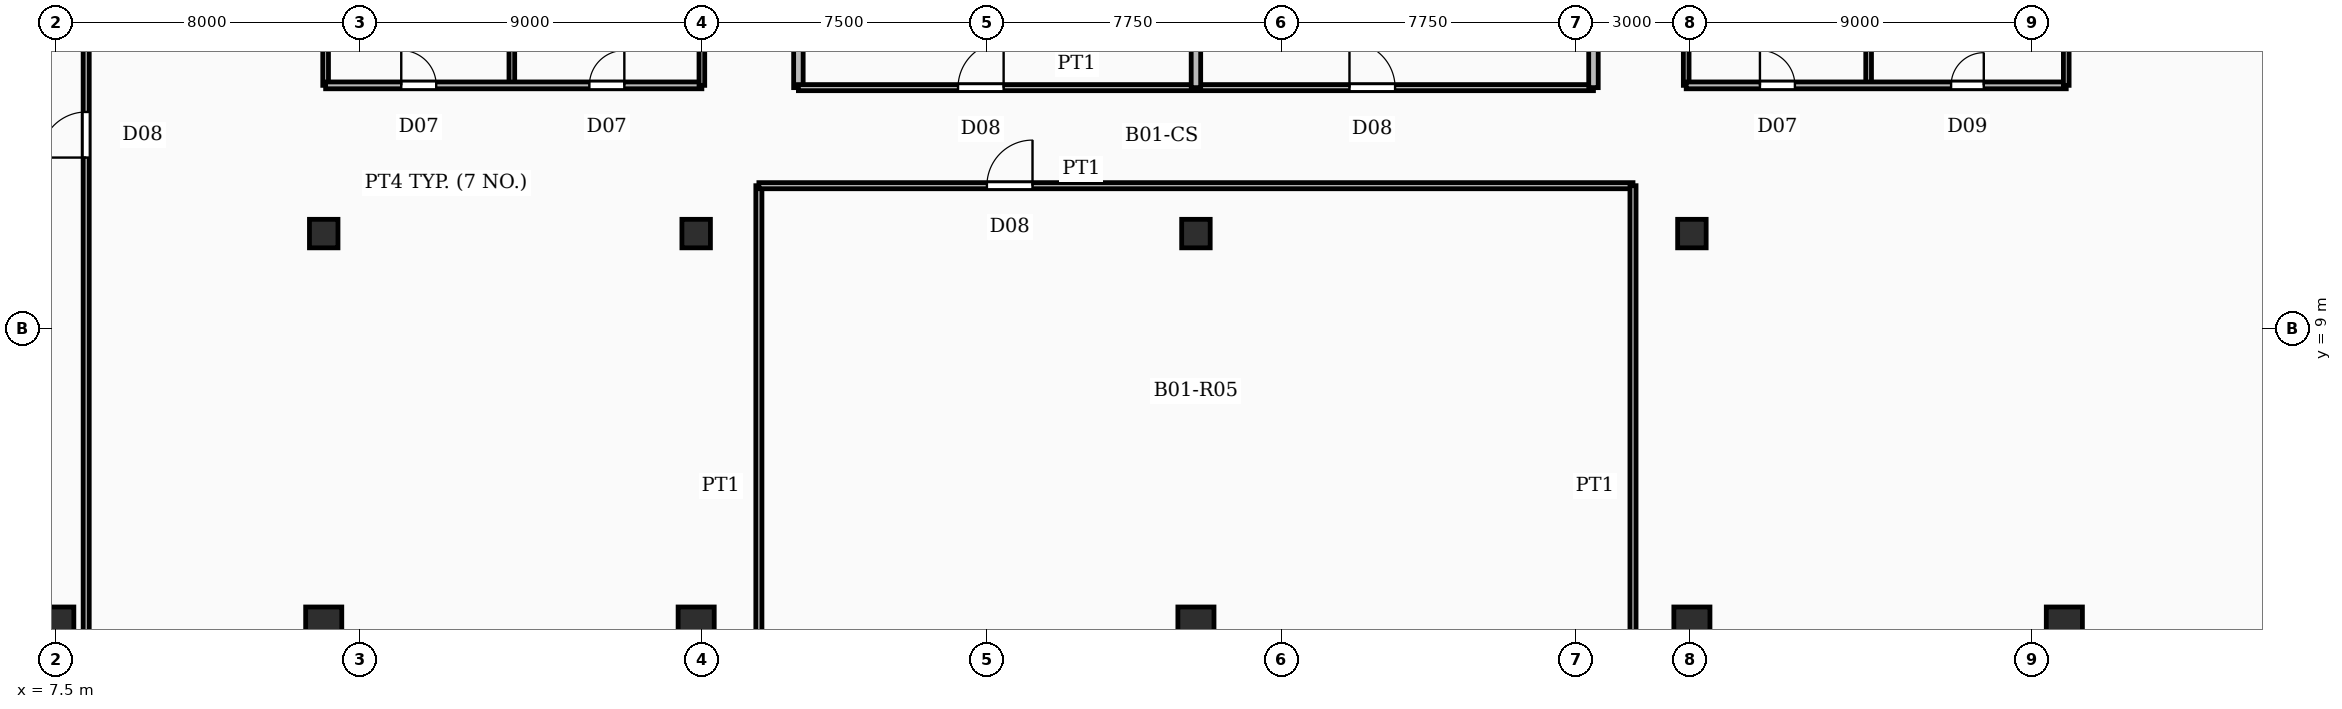
"""IFC4 building model, lengths in metres.
Left out: names, types, materials, properties, quantities, classifications, styles, units other than length and angle.
Written with IfcOpenShell. Run it as: python <this file> out.ifc"""

import sys

from ifc_helpers import new_model, si_unit, direction, frame, frame_2d, origin, origin_2d, place, context, subcontext, project, spatial, rectangle, extrude, element, fill, save


model = new_model("IFC4")
c1 = context("Model", 3, precision=1e-05, world=origin(), true_north=direction((0.0, 1.0)))
c2 = subcontext(c1, "Body", "Model", "MODEL_VIEW")
j1 = project(units=[si_unit("LENGTHUNIT", "METRE"), si_unit("PLANEANGLEUNIT", "RADIAN")], contexts=[c1])
p1 = place(None, origin())
s1 = spatial("IfcSite", under=j1, at=p1, CompositionType="ELEMENT")
p2 = place(p1, origin())
s2 = spatial("IfcBuilding", under=s1, at=p2, CompositionType="ELEMENT")
p3 = place(p2, frame((0.0, 0.0, -5.0)))
s3 = spatial("IfcBuildingStorey", under=s2, at=p3, CompositionType="ELEMENT", Elevation=-5.0)
for number, where, z_axis, x_axis in (
    (1, (7.5, 1.2, -0.31), (0.0, 0.0, 1.0), (1.0, 0.0, 0.0)),
    (2, (14.55, 1.2, -0.31), (0.0, 0.0, 1.0), (1.0, 0.0, 0.0)),
    (3, (24.35, 1.2, -0.31), (0.0, 0.0, 1.0), (1.0, 0.0, 0.0)),
    (4, (37.5, 1.2, -0.31), (0.0, 0.0, 1.0), (1.0, 0.0, 0.0)),
    (5, (50.55, 1.2, -0.31), (0.0, 0.0, 1.0), (1.0, 0.0, 0.0)),
    (6, (60.35, 1.2, -0.31), (0.0, 0.0, 1.0), (1.0, 0.0, 0.0)),
):
    element("IfcColumn", number, at=place(p3, frame(where, z_axis=z_axis, x_axis=x_axis)), inside=s3, PredefinedType="COLUMN", context=c2, shape_type="SweptSolid", body=[
        extrude(rectangle(XDim=0.95, YDim=0.95, at=origin_2d()), origin(), (0.0, 0.0, 1.0), 4.86),
    ])
for number, where, z_axis, x_axis in (
    (7, (14.55, 11.5, -0.31), (0.0, 0.0, 1.0), (1.0, 0.0, 0.0)),
    (8, (24.35, 11.5, -0.31), (0.0, 0.0, 1.0), (1.0, 0.0, 0.0)),
    (9, (37.5, 11.5, -0.31), (0.0, 0.0, 1.0), (1.0, 0.0, 0.0)),
    (10, (50.55, 11.5, -0.31), (0.0, 0.0, 1.0), (1.0, 0.0, 0.0)),
):
    element("IfcColumn", number, at=place(p3, frame(where, z_axis=z_axis, x_axis=x_axis)), inside=s3, PredefinedType="COLUMN", context=c2, shape_type="SweptSolid", body=[
        extrude(rectangle(XDim=0.75, YDim=0.75, at=origin_2d()), origin(), (0.0, 0.0, 1.0), 4.86),
    ])
p4 = place(p3, frame((19.5, 15.4, 0.0), z_axis=(0.0, 0.0, 1.0), x_axis=(0.0, 1.0, 0.0)))
e11 = element("IfcWall", 11, at=p4, inside=s3, PredefinedType="PARTITIONING", context=c2, shape_type="SweptSolid", body=[
    extrude(rectangle(XDim=3.58, YDim=0.15, at=frame_2d((1.79, 0.0))), origin(), (0.0, 0.0, 1.0), 3.61),
])
p5 = place(p3, frame((14.6, 15.4, 0.0), z_axis=(0.0, 0.0, 1.0), x_axis=(1.0, 0.0, 0.0)))
e12 = element("IfcWall", 12, at=p5, inside=s3, PredefinedType="PARTITIONING", context=c2, shape_type="SweptSolid", body=[
    extrude(rectangle(XDim=9.9, YDim=0.18, at=frame_2d((4.95, 0.0))), origin(), (0.0, 0.0, 1.0), 3.61),
])
p6 = place(p5, frame((1.99, 0.0, 0.0)))
e13 = element("IfcOpeningElement", 13, at=p6, cuts=e12, PredefinedType="OPENING", context=c2, shape_type="SweptSolid", body=[
    extrude(rectangle(XDim=0.92, YDim=2.1, at=frame_2d((0.46, 1.05))), frame((0.0, 0.1, 0.0), z_axis=(0.0, -1.0, 0.0), x_axis=(1.0, 0.0, 0.0)), (0.0, 0.0, 1.0), 0.2),
])
p7 = place(p5, frame((6.94, 0.0, 0.0)))
e14 = element("IfcOpeningElement", 14, at=p7, cuts=e12, PredefinedType="OPENING", context=c2, shape_type="SweptSolid", body=[
    extrude(rectangle(XDim=0.92, YDim=2.1, at=frame_2d((0.46, 1.05))), frame((0.0, 0.1, 0.0), z_axis=(0.0, -1.0, 0.0), x_axis=(1.0, 0.0, 0.0)), (0.0, 0.0, 1.0), 0.2),
])
for number, where, z_axis, x_axis in (
    (15, (14.6, 15.4, 0.0), (0.0, 0.0, 1.0), (0.0, 1.0, 0.0)),
    (16, (24.5, 15.4, 0.0), (0.0, 0.0, 1.0), (0.0, 1.0, 0.0)),
    (17, (55.2, 15.4, 0.0), (0.0, 0.0, 1.0), (0.0, 1.0, 0.0)),
):
    element("IfcWall", number, at=place(p3, frame(where, z_axis=z_axis, x_axis=x_axis)), inside=s3, PredefinedType="PARTITIONING", context=c2, shape_type="SweptSolid", body=[
        extrude(rectangle(XDim=3.58, YDim=0.15, at=frame_2d((1.79, 0.0))), origin(), (0.0, 0.0, 1.0), 3.61),
    ])
p8 = place(p3, frame((50.4, 15.4, 0.0), z_axis=(0.0, 0.0, 1.0), x_axis=(1.0, 0.0, 0.0)))
e18 = element("IfcWall", 18, at=p8, inside=s3, PredefinedType="SOLIDWALL", context=c2, shape_type="SweptSolid", body=[
    extrude(rectangle(XDim=10.0, YDim=0.18, at=frame_2d((5.0, 0.0))), origin(), (0.0, 0.0, 1.0), 3.61),
])
p9 = place(p8, frame((1.94, 0.0, 0.0)))
e19 = element("IfcOpeningElement", 19, at=p9, cuts=e18, PredefinedType="OPENING", context=c2, shape_type="SweptSolid", body=[
    extrude(rectangle(XDim=0.92, YDim=2.1, at=frame_2d((0.46, 1.05))), frame((0.0, 0.1, 0.0), z_axis=(0.0, -1.0, 0.0), x_axis=(1.0, 0.0, 0.0)), (0.0, 0.0, 1.0), 0.2),
])
p10 = place(p8, frame((6.97, 0.0, 0.0)))
e20 = element("IfcOpeningElement", 20, at=p10, cuts=e18, PredefinedType="OPENING", context=c2, shape_type="SweptSolid", body=[
    extrude(rectangle(XDim=0.86, YDim=2.05, at=frame_2d((0.43, 1.025))), frame((0.0, 0.1, 0.0), z_axis=(0.0, -1.0, 0.0), x_axis=(1.0, 0.0, 0.0)), (0.0, 0.0, 1.0), 0.2),
])
for number, where, z_axis, x_axis in (
    (21, (50.4, 15.4, 0.0), (0.0, 0.0, 1.0), (0.0, 1.0, 0.0)),
    (22, (60.4, 15.4, 0.0), (0.0, 0.0, 1.0), (0.0, 1.0, 0.0)),
):
    element("IfcWall", number, at=place(p3, frame(where, z_axis=z_axis, x_axis=x_axis)), inside=s3, PredefinedType="PARTITIONING", context=c2, shape_type="SweptSolid", body=[
        extrude(rectangle(XDim=3.58, YDim=0.15, at=frame_2d((1.79, 0.0))), origin(), (0.0, 0.0, 1.0), 3.61),
    ])
p11 = place(p3, frame((27.04, 15.34, 0.0), z_axis=(0.0, 0.0, 1.0), x_axis=(1.0, 0.0, 0.0)))
e23 = element("IfcWall", 23, at=p11, inside=s3, PredefinedType="PARTITIONING", context=c2, shape_type="SweptSolid", body=[
    extrude(rectangle(XDim=20.92, YDim=0.16, at=frame_2d((10.46, 0.0))), origin(), (0.0, 0.0, 1.0), 3.61),
])
p12 = place(p11, frame((4.2, 0.0, 0.0)))
e24 = element("IfcOpeningElement", 24, at=p12, cuts=e23, PredefinedType="OPENING", context=c2, shape_type="SweptSolid", body=[
    extrude(rectangle(XDim=1.2, YDim=2.2, at=frame_2d((0.6, 1.1))), frame((0.0, 0.09, 0.0), z_axis=(0.0, -1.0, 0.0), x_axis=(1.0, 0.0, 0.0)), (0.0, 0.0, 1.0), 0.18),
])
p13 = place(p11, frame((14.5, 0.0, 0.0)))
e25 = element("IfcOpeningElement", 25, at=p13, cuts=e23, PredefinedType="OPENING", context=c2, shape_type="SweptSolid", body=[
    extrude(rectangle(XDim=1.2, YDim=2.2, at=frame_2d((0.6, 1.1))), frame((0.0, 0.09, 0.0), z_axis=(0.0, -1.0, 0.0), x_axis=(1.0, 0.0, 0.0)), (0.0, 0.0, 1.0), 0.18),
])
p14 = place(p3, frame((26.0, 12.76, 0.0), z_axis=(0.0, 0.0, 1.0), x_axis=(1.0, 0.0, 0.0)))
e26 = element("IfcWall", 26, at=p14, inside=s3, PredefinedType="PARTITIONING", context=c2, shape_type="SweptSolid", body=[
    extrude(rectangle(XDim=23.0, YDim=0.16, at=frame_2d((11.5, 0.0))), origin(), (0.0, 0.0, 1.0), 3.61),
])
p15 = place(p14, frame((6.0, 0.0, 0.0)))
e27 = element("IfcOpeningElement", 27, at=p15, cuts=e26, PredefinedType="OPENING", context=c2, shape_type="SweptSolid", body=[
    extrude(rectangle(XDim=1.2, YDim=2.2, at=frame_2d((0.6, 1.1))), frame((0.0, 0.09, 0.0), z_axis=(0.0, -1.0, 0.0), x_axis=(1.0, 0.0, 0.0)), (0.0, 0.0, 1.0), 0.18),
])
for number, where, z_axis, x_axis in (
    (28, (26.0, 0.6, 0.0), (0.0, 0.0, 1.0), (0.0, 1.0, 0.0)),
    (29, (49.0, 0.6, 0.0), (0.0, 0.0, 1.0), (0.0, 1.0, 0.0)),
):
    element("IfcWall", number, at=place(p3, frame(where, z_axis=z_axis, x_axis=x_axis)), inside=s3, PredefinedType="PARTITIONING", context=c2, shape_type="SweptSolid", body=[
        extrude(rectangle(XDim=12.16, YDim=0.16, at=frame_2d((6.08, 0.0))), origin(), (0.0, 0.0, 1.0), 3.61),
    ])
p16 = place(p3, frame((8.3, 0.5, 0.0), z_axis=(0.0, 0.0, 1.0), x_axis=(0.0, 1.0, 0.0)))
e30 = element("IfcWall", 30, at=p16, inside=s3, PredefinedType="PARTITIONING", context=c2, shape_type="SweptSolid", body=[
    extrude(rectangle(XDim=53.5, YDim=0.16, at=frame_2d((26.75, 0.0))), origin(), (0.0, 0.0, 1.0), 3.61),
])
p17 = place(p16, frame((13.0, 0.0, 0.0)))
e31 = element("IfcOpeningElement", 31, at=p17, cuts=e30, PredefinedType="OPENING", context=c2, shape_type="SweptSolid", body=[
    extrude(rectangle(XDim=1.2, YDim=2.2, at=frame_2d((0.6, 1.1))), frame((0.0, 0.09, 0.0), z_axis=(0.0, -1.0, 0.0), x_axis=(1.0, 0.0, 0.0)), (0.0, 0.0, 1.0), 0.18),
])
p18 = place(p3, frame((37.5, 15.34, 0.0), z_axis=(0.0, 0.0, 1.0), x_axis=(0.0, 1.0, 0.0)))
e32 = element("IfcWall", 32, at=p18, inside=s3, PredefinedType="SOLIDWALL", context=c2, shape_type="SweptSolid", body=[
    extrude(rectangle(XDim=26.31, YDim=0.25, at=frame_2d((13.155, 0.0))), origin(), (0.0, 0.0, 1.0), 3.61),
])
p19 = place(p3, frame((27.04, 15.34, 0.0), z_axis=(0.0, 0.0, 1.0), x_axis=(0.0, 1.0, 0.0)))
e33 = element("IfcWall", 33, at=p19, inside=s3, PredefinedType="SOLIDWALL", context=c2, shape_type="SweptSolid", body=[
    extrude(rectangle(XDim=26.31, YDim=0.25, at=frame_2d((13.155, 0.0))), origin(), (0.0, 0.0, 1.0), 3.61),
])
p20 = place(p19, frame((18.0, 0.0, 0.0)))
e34 = element("IfcOpeningElement", 34, at=p20, cuts=e33, PredefinedType="OPENING", context=c2, shape_type="SweptSolid", body=[
    extrude(rectangle(XDim=1.2, YDim=2.2, at=frame_2d((0.6, 1.1))), frame((0.0, 0.135, 0.0), z_axis=(0.0, -1.0, 0.0), x_axis=(1.0, 0.0, 0.0)), (0.0, 0.0, 1.0), 0.27),
])
p21 = place(p3, frame((47.96, 15.34, 0.0), z_axis=(0.0, 0.0, 1.0), x_axis=(0.0, 1.0, 0.0)))
e35 = element("IfcWall", 35, at=p21, inside=s3, PredefinedType="SOLIDWALL", context=c2, shape_type="SweptSolid", body=[
    extrude(rectangle(XDim=26.31, YDim=0.25, at=frame_2d((13.155, 0.0))), origin(), (0.0, 0.0, 1.0), 3.61),
])
p22 = place(p21, frame((18.0, 0.0, 0.0)))
e36 = element("IfcOpeningElement", 36, at=p22, cuts=e35, PredefinedType="OPENING", context=c2, shape_type="SweptSolid", body=[
    extrude(rectangle(XDim=1.2, YDim=2.2, at=frame_2d((0.6, 1.1))), frame((0.0, 0.135, 0.0), z_axis=(0.0, -1.0, 0.0), x_axis=(1.0, 0.0, 0.0)), (0.0, 0.0, 1.0), 0.27),
])
p23 = place(p6, origin())
e37 = element("IfcDoor", 37, at=p23, inside=s3, OperationType="SINGLE_SWING_LEFT", PredefinedType="DOOR", context=c2, shape_type="SweptSolid", body=[
    extrude(rectangle(XDim=0.92, YDim=2.1, at=frame_2d((0.46, 1.05))), frame((0.0, 0.025, 0.0), z_axis=(0.0, -1.0, 0.0), x_axis=(1.0, 0.0, 0.0)), (0.0, 0.0, 1.0), 0.05),
])
fill(e13, e37)
p24 = place(p7, origin())
e38 = element("IfcDoor", 38, at=p24, inside=s3, OperationType="SINGLE_SWING_RIGHT", PredefinedType="DOOR", context=c2, shape_type="SweptSolid", body=[
    extrude(rectangle(XDim=0.92, YDim=2.1, at=frame_2d((0.46, 1.05))), frame((0.0, 0.025, 0.0), z_axis=(0.0, -1.0, 0.0), x_axis=(1.0, 0.0, 0.0)), (0.0, 0.0, 1.0), 0.05),
])
fill(e14, e38)
p25 = place(p9, origin())
e39 = element("IfcDoor", 39, at=p25, inside=s3, OperationType="SINGLE_SWING_LEFT", PredefinedType="DOOR", context=c2, shape_type="SweptSolid", body=[
    extrude(rectangle(XDim=0.92, YDim=2.1, at=frame_2d((0.46, 1.05))), frame((0.0, 0.025, 0.0), z_axis=(0.0, -1.0, 0.0), x_axis=(1.0, 0.0, 0.0)), (0.0, 0.0, 1.0), 0.05),
])
fill(e19, e39)
p26 = place(p10, origin())
e40 = element("IfcDoor", 40, at=p26, inside=s3, OperationType="SINGLE_SWING_RIGHT", PredefinedType="DOOR", context=c2, shape_type="SweptSolid", body=[
    extrude(rectangle(XDim=0.86, YDim=2.05, at=frame_2d((0.43, 1.025))), frame((0.0, 0.025, 0.0), z_axis=(0.0, -1.0, 0.0), x_axis=(1.0, 0.0, 0.0)), (0.0, 0.0, 1.0), 0.05),
])
fill(e20, e40)
p27 = place(p12, origin())
e41 = element("IfcDoor", 41, at=p27, inside=s3, OperationType="SINGLE_SWING_RIGHT", PredefinedType="DOOR", context=c2, shape_type="SweptSolid", body=[
    extrude(rectangle(XDim=1.2, YDim=2.2, at=frame_2d((0.6, 1.1))), frame((0.0, 0.025, 0.0), z_axis=(0.0, -1.0, 0.0), x_axis=(1.0, 0.0, 0.0)), (0.0, 0.0, 1.0), 0.05),
])
fill(e24, e41)
p28 = place(p13, origin())
e42 = element("IfcDoor", 42, at=p28, inside=s3, OperationType="SINGLE_SWING_LEFT", PredefinedType="DOOR", context=c2, shape_type="SweptSolid", body=[
    extrude(rectangle(XDim=1.2, YDim=2.2, at=frame_2d((0.6, 1.1))), frame((0.0, 0.025, 0.0), z_axis=(0.0, -1.0, 0.0), x_axis=(1.0, 0.0, 0.0)), (0.0, 0.0, 1.0), 0.05),
])
fill(e25, e42)
p29 = place(p15, origin())
e43 = element("IfcDoor", 43, at=p29, inside=s3, OperationType="SINGLE_SWING_RIGHT", PredefinedType="DOOR", context=c2, shape_type="SweptSolid", body=[
    extrude(rectangle(XDim=1.2, YDim=2.2, at=frame_2d((0.6, 1.1))), frame((0.0, 0.025, 0.0), z_axis=(0.0, -1.0, 0.0), x_axis=(1.0, 0.0, 0.0)), (0.0, 0.0, 1.0), 0.05),
])
fill(e27, e43)
p30 = place(p17, origin())
e44 = element("IfcDoor", 44, at=p30, inside=s3, OperationType="SINGLE_SWING_LEFT", PredefinedType="DOOR", context=c2, shape_type="SweptSolid", body=[
    extrude(rectangle(XDim=1.2, YDim=2.2, at=frame_2d((0.6, 1.1))), frame((0.0, 0.025, 0.0), z_axis=(0.0, -1.0, 0.0), x_axis=(1.0, 0.0, 0.0)), (0.0, 0.0, 1.0), 0.05),
])
fill(e31, e44)
save(model, sys.argv[1])
